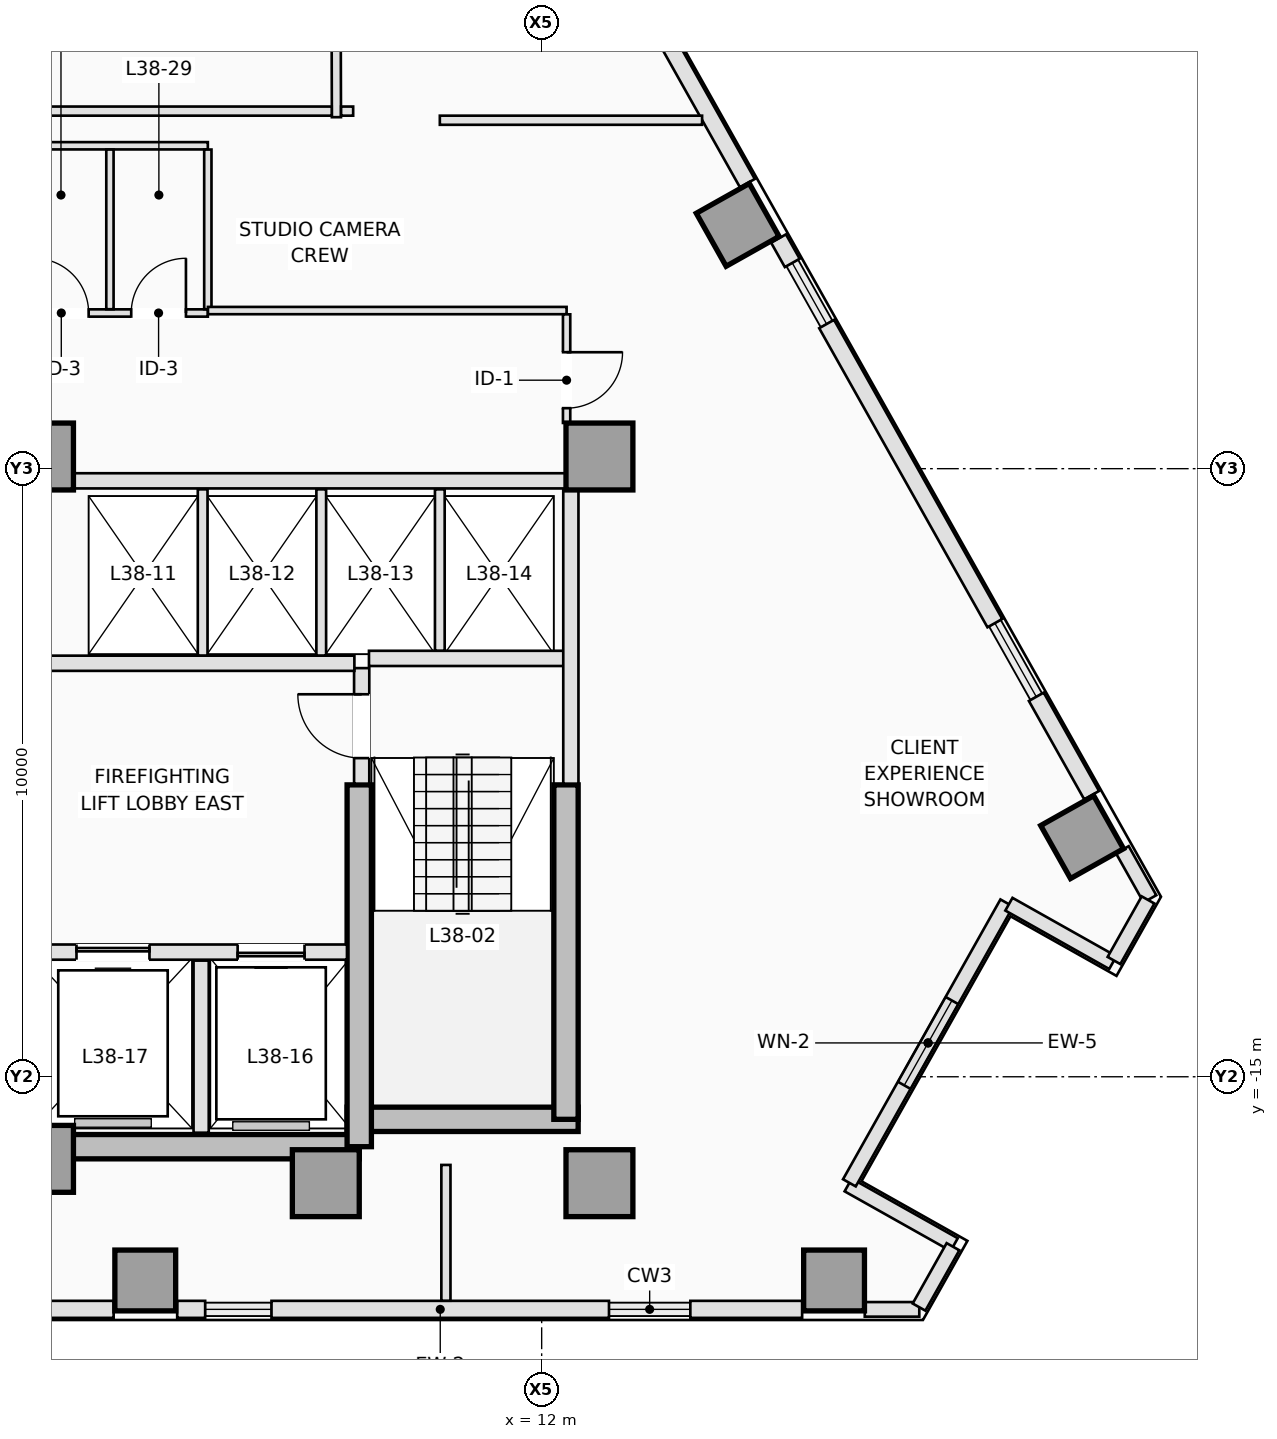
"""IFC4 building model, lengths in metres.
Left out: names, types, materials, properties, quantities, classifications, styles, units other than length and angle.
Written with IfcOpenShell. Run it as: python <this file> out.ifc"""

import sys

from ifc_helpers import new_model, si_unit, direction, frame, frame_2d, origin, origin_2d, place, context, subcontext, project, spatial, rectangle, extrude, element, fill, save


model = new_model("IFC4")
c1 = context("Model", 3, precision=1e-05, world=origin(), true_north=direction((0.0, 1.0)))
c2 = subcontext(c1, "Body", "Model", "MODEL_VIEW")
j1 = project(units=[si_unit("LENGTHUNIT", "METRE"), si_unit("PLANEANGLEUNIT", "RADIAN")], contexts=[c1])
p1 = place(None, origin())
s1 = spatial("IfcSite", under=j1, at=p1, CompositionType="ELEMENT")
p2 = place(p1, origin())
s2 = spatial("IfcBuilding", under=s1, at=p2, CompositionType="ELEMENT")
p3 = place(p2, frame((0.0, 0.0, 140.5)))
s3 = spatial("IfcBuildingStorey", under=s2, at=p3, CompositionType="ELEMENT", Elevation=140.5)
p4 = place(p3, frame((3.75, -16.15, 0.0), z_axis=(0.0, 0.0, 1.0), x_axis=(1.0, 0.0, 0.0)))
e1 = element("IfcWall", 1, at=p4, inside=s3, PredefinedType="SHEAR", context=c2, shape_type="SweptSolid", body=[
    extrude(rectangle(XDim=5.25, YDim=0.4, at=frame_2d((2.625, 0.0))), origin(), (0.0, 0.0, 1.0), 3.5),
])
p5 = place(p3, frame((8.8, -15.7, 0.0), z_axis=(0.0, 0.0, 1.0), x_axis=(1.0, 0.0, 0.0)))
e2 = element("IfcWall", 2, at=p5, inside=s3, PredefinedType="SHEAR", context=c2, shape_type="SweptSolid", body=[
    extrude(rectangle(XDim=3.8, YDim=0.4, at=frame_2d((1.9, 0.0))), origin(), (0.0, 0.0, 1.0), 3.5),
])
p6 = place(p3, frame((12.4, -15.7, 0.0), z_axis=(0.0, 0.0, 1.0), x_axis=(0.0, 1.0, 0.0)))
e3 = element("IfcWall", 3, at=p6, inside=s3, PredefinedType="SHEAR", context=c2, shape_type="SweptSolid", body=[
    extrude(rectangle(XDim=5.5, YDim=0.4, at=frame_2d((2.75, 0.0))), origin(), (0.0, 0.0, 1.0), 3.5),
])
p7 = place(p3, frame((9.0, -16.15, 0.0), z_axis=(0.0, 0.0, 1.0), x_axis=(0.0, 1.0, 0.0)))
e4 = element("IfcWall", 4, at=p7, inside=s3, PredefinedType="SHEAR", context=c2, shape_type="SweptSolid", body=[
    extrude(rectangle(XDim=5.95, YDim=0.4, at=frame_2d((2.975, 0.0))), origin(), (0.0, 0.0, 1.0), 3.5),
])
for number, where, z_axis, x_axis in (
    (5, (3.75, -16.35, 0.0), (0.0, 0.0, 1.0), (1.0, 0.0, 0.0)),
    (6, (8.45, -16.75, 0.0), (0.0, 0.0, 1.0), (1.0, 0.0, 0.0)),
    (7, (12.95, -16.75, 0.0), (0.0, 0.0, 1.0), (1.0, 0.0, 0.0)),
    (8, (3.75, -4.8, 0.0), (0.0, 0.0, 1.0), (1.0, 0.0, 0.0)),
    (9, (12.95, -4.8, 0.0), (0.0, 0.0, 1.0), (1.0, 0.0, 0.0)),
):
    element("IfcColumn", number, at=place(p3, frame(where, z_axis=z_axis, x_axis=x_axis)), inside=s3, PredefinedType="COLUMN", context=c2, shape_type="SweptSolid", body=[
        extrude(rectangle(XDim=1.1, YDim=1.1, at=origin_2d()), origin(), (0.0, 0.0, 1.0), 3.5),
    ])
for number, where, z_axis, x_axis in (
    (10, (5.481, -18.35, 0.0), (0.0, 0.0, 1.0), (0.0, 1.0, 0.0)),
    (11, (16.808, -18.35, 0.0), (0.0, 0.0, 1.0), (0.0, 1.0, 0.0)),
    (12, (20.888, -11.06, 0.0), (0.0, 0.0, 1.0), (0.872, 0.49, 0.0)),
    (13, (15.224, -0.991, 0.0), (0.0, 0.0, 1.0), (0.872, 0.49, 0.0)),
):
    element("IfcColumn", number, at=place(p3, frame(where, z_axis=z_axis, x_axis=x_axis)), inside=s3, PredefinedType="COLUMN", context=c2, shape_type="SweptSolid", body=[
        extrude(rectangle(XDim=1.0, YDim=1.0, at=origin_2d()), origin(), (0.0, 0.0, 1.0), 3.5),
    ])
p8 = place(p3, frame((18.21, -18.825, 0.0), z_axis=(0.0, 0.0, 1.0), x_axis=(-1.0, 0.0, 0.0)))
e14 = element("IfcWall", 14, at=p8, inside=s3, PredefinedType="STANDARD", context=c2, shape_type="SweptSolid", body=[
    extrude(rectangle(XDim=0.896, YDim=0.24, at=frame_2d((0.448, 0.0))), origin(), (0.0, 0.0, 1.0), 3.25),
])
p9 = place(p3, frame((16.283, -18.825, 0.0), z_axis=(0.0, 0.0, 1.0), x_axis=(-1.0, 0.0, 0.0)))
e15 = element("IfcWall", 15, at=p9, inside=s3, PredefinedType="STANDARD", context=c2, shape_type="SweptSolid", body=[
    extrude(rectangle(XDim=1.838, YDim=0.28, at=frame_2d((0.919, 0.0))), origin(), (0.0, 0.0, 1.0), 3.25),
])
p10 = place(p3, frame((13.107, -18.825, 0.0), z_axis=(0.0, 0.0, 1.0), x_axis=(-1.0, 0.0, 0.0)))
e16 = element("IfcWall", 16, at=p10, inside=s3, PredefinedType="STANDARD", context=c2, shape_type="SweptSolid", body=[
    extrude(rectangle(XDim=5.55, YDim=0.28, at=frame_2d((2.775, 0.0))), origin(), (0.0, 0.0, 1.0), 3.25),
])
p11 = place(p3, frame((6.466, -18.825, 0.0), z_axis=(0.0, 0.0, 1.0), x_axis=(-1.0, 0.0, 0.0)))
e17 = element("IfcWall", 17, at=p11, inside=s3, PredefinedType="STANDARD", context=c2, shape_type="SweptSolid", body=[
    extrude(rectangle(XDim=0.46, YDim=0.28, at=frame_2d((0.23, 0.0))), origin(), (0.0, 0.0, 1.0), 3.25),
])
p12 = place(p3, frame((4.961, -18.825, 0.0), z_axis=(0.0, 0.0, 1.0), x_axis=(-1.0, 0.0, 0.0)))
e18 = element("IfcWall", 18, at=p12, inside=s3, PredefinedType="STANDARD", context=c2, shape_type="SweptSolid", body=[
    extrude(rectangle(XDim=4.292, YDim=0.28, at=frame_2d((2.146, 0.0))), origin(), (0.0, 0.0, 1.0), 3.25),
])
p13 = place(p3, frame((21.549, -11.267, 0.0), z_axis=(0.0, 0.0, 1.0), x_axis=(0.490248718924, -0.871582579905, 0.0)))
e19 = element("IfcWall", 19, at=p13, inside=s3, PredefinedType="STANDARD", context=c2, shape_type="SweptSolid", body=[
    extrude(rectangle(XDim=0.926, YDim=0.24, at=frame_2d((0.463, 0.0))), origin(), (0.0, 0.0, 1.0), 3.25),
])
p14 = place(p3, frame((15.896, -1.215, 0.0), z_axis=(0.0, 0.0, 1.0), x_axis=(0.490009165718, -0.871717280724, 0.0)))
e20 = element("IfcWall", 20, at=p14, inside=s3, PredefinedType="STANDARD", context=c2, shape_type="SweptSolid", body=[
    extrude(rectangle(XDim=0.46, YDim=0.28, at=frame_2d((0.23, 0.0))), origin(), (0.0, 0.0, 1.0), 3.25),
])
p15 = place(p3, frame((16.686, -2.621, 0.0), z_axis=(0.0, 0.0, 1.0), x_axis=(0.490238645956, -0.871588245682, 0.0)))
e21 = element("IfcWall", 21, at=p15, inside=s3, PredefinedType="STANDARD", context=c2, shape_type="SweptSolid", body=[
    extrude(rectangle(XDim=5.643, YDim=0.28, at=frame_2d((2.822, 0.0))), origin(), (0.0, 0.0, 1.0), 3.25),
])
p16 = place(p3, frame((20.134, -8.751, 0.0), z_axis=(0.0, 0.0, 1.0), x_axis=(0.490248749158, -0.871582562899, 0.0)))
e22 = element("IfcWall", 22, at=p16, inside=s3, PredefinedType="STANDARD", context=c2, shape_type="SweptSolid", body=[
    extrude(rectangle(XDim=1.856, YDim=0.28, at=frame_2d((0.928, 0.0))), origin(), (0.0, 0.0, 1.0), 3.25),
])
p17 = place(p3, frame((13.238, 3.509, 0.0), z_axis=(0.0, 0.0, 1.0), x_axis=(0.490232095789, -0.871591929895, 0.0)))
e23 = element("IfcWall", 23, at=p17, inside=s3, PredefinedType="STANDARD", context=c2, shape_type="SweptSolid", body=[
    extrude(rectangle(XDim=4.375, YDim=0.28, at=frame_2d((2.188, 0.0))), origin(), (0.0, 0.0, 1.0), 3.25),
])
p18 = place(p3, frame((18.784, -17.76, 0.0), z_axis=(0.0, 0.0, 1.0), x_axis=(-0.871536415941, 0.49033078191, 0.0)))
e24 = element("IfcWall", 24, at=p18, inside=s3, PredefinedType="STANDARD", context=c2, shape_type="SweptSolid", body=[
    extrude(rectangle(XDim=2.0, YDim=0.24, at=frame_2d((1.0, 0.0))), origin(), (0.0, 0.0, 1.0), 3.25),
])
p19 = place(p3, frame((17.06, -16.744, 0.0), z_axis=(0.0, 0.0, 1.0), x_axis=(0.490276606961, 0.871566892824, 0.0)))
e25 = element("IfcWall", 25, at=p19, inside=s3, PredefinedType="STANDARD", context=c2, shape_type="SweptSolid", body=[
    extrude(rectangle(XDim=5.28, YDim=0.24, at=frame_2d((2.64, 0.0))), origin(), (0.0, 0.0, 1.0), 3.25),
])
p20 = place(p19, frame((1.84, 0.0, 0.9)))
e26 = element("IfcOpeningElement", 26, at=p20, cuts=e25, PredefinedType="OPENING", context=c2, shape_type="SweptSolid", body=[
    extrude(rectangle(XDim=1.6, YDim=2.1, at=frame_2d((0.8, 1.05))), frame((0.0, 0.13, 0.0), z_axis=(0.0, -1.0, 0.0), x_axis=(1.0, 0.0, 0.0)), (0.0, 0.0, 1.0), 0.26),
])
p21 = place(p3, frame((19.684, -12.162, 0.0), z_axis=(0.0, 0.0, 1.0), x_axis=(0.871512328312, -0.490373593906, 0.0)))
e27 = element("IfcWall", 27, at=p21, inside=s3, PredefinedType="STANDARD", context=c2, shape_type="SweptSolid", body=[
    extrude(rectangle(XDim=1.96, YDim=0.24, at=frame_2d((0.98, 0.0))), origin(), (0.0, 0.0, 1.0), 3.25),
])
p22 = place(p3, frame((21.412, -13.088, 0.0), z_axis=(0.0, 0.0, 1.0), x_axis=(0.4900989379, 0.871666811958, 0.0)))
e28 = element("IfcWall", 28, at=p22, inside=s3, PredefinedType="STANDARD", context=c2, shape_type="SweptSolid", body=[
    extrude(rectangle(XDim=1.143, YDim=0.24, at=frame_2d((0.571, 0.0))), origin(), (0.0, 0.0, 1.0), 3.25),
])
p23 = place(p3, frame((18.206, -18.788, 0.0), z_axis=(0.0, 0.0, 1.0), x_axis=(0.490403700594, 0.871495387506, 0.0)))
e29 = element("IfcWall", 29, at=p23, inside=s3, PredefinedType="STANDARD", context=c2, shape_type="SweptSolid", body=[
    extrude(rectangle(XDim=1.139, YDim=0.24, at=frame_2d((0.57, 0.0))), origin(), (0.0, 0.0, 1.0), 3.25),
])
p24 = place(p3, frame((9.04, -10.18, 0.0), z_axis=(0.0, 0.0, 1.0), x_axis=(0.0, 1.0, 0.0)))
e30 = element("IfcWall", 30, at=p24, inside=s3, PredefinedType="PARTITIONING", context=c2, shape_type="SweptSolid", body=[
    extrude(rectangle(XDim=1.9, YDim=0.25, at=frame_2d((0.95, 0.0))), origin(), (0.0, 0.0, 1.0), 3.25),
])
p25 = place(p24, frame((0.42, 0.0, 0.0)))
e31 = element("IfcOpeningElement", 31, at=p25, cuts=e30, PredefinedType="OPENING", context=c2, shape_type="SweptSolid", body=[
    extrude(rectangle(XDim=1.05, YDim=2.15, at=frame_2d((0.525, 1.075))), frame((0.0, 0.135, 0.0), z_axis=(0.0, -1.0, 0.0), x_axis=(1.0, 0.0, 0.0)), (0.0, 0.0, 1.0), 0.27),
])
p26 = place(p3, frame((9.16, -8.12, 0.0), z_axis=(0.0, 0.0, 1.0), x_axis=(1.0, 0.0, 0.0)))
e32 = element("IfcWall", 32, at=p26, inside=s3, PredefinedType="PARTITIONING", context=c2, shape_type="SweptSolid", body=[
    extrude(rectangle(XDim=3.22, YDim=0.25, at=frame_2d((1.61, 0.0))), origin(), (0.0, 0.0, 1.0), 3.25),
])
p27 = place(p3, frame((12.48, -10.18, 0.0), z_axis=(0.0, 0.0, 1.0), x_axis=(0.0, 1.0, 0.0)))
e33 = element("IfcWall", 33, at=p27, inside=s3, PredefinedType="PARTITIONING", context=c2, shape_type="SweptSolid", body=[
    extrude(rectangle(XDim=4.828, YDim=0.25, at=frame_2d((2.414, 0.0))), origin(), (0.0, 0.0, 1.0), 3.25),
])
p28 = place(p3, frame((3.68, -12.95, 0.0), z_axis=(0.0, 0.0, 1.0), x_axis=(1.0, 0.0, 0.0)))
e34 = element("IfcWall", 34, at=p28, inside=s3, PredefinedType="PARTITIONING", context=c2, shape_type="SweptSolid", body=[
    extrude(rectangle(XDim=5.118, YDim=0.25, at=frame_2d((2.559, 0.0))), origin(), (0.0, 0.0, 1.0), 3.25),
])
p29 = place(p28, frame((3.32, 0.0, 0.0)))
e35 = element("IfcOpeningElement", 35, at=p29, cuts=e34, PredefinedType="OPENING", context=c2, shape_type="SweptSolid", body=[
    extrude(rectangle(XDim=1.1, YDim=2.15, at=frame_2d((0.55, 1.075))), frame((0.0, 0.135, 0.0), z_axis=(0.0, -1.0, 0.0), x_axis=(1.0, 0.0, 0.0)), (0.0, 0.0, 1.0), 0.27),
])
p30 = place(p28, frame((0.67, 0.0, 0.0)))
e36 = element("IfcOpeningElement", 36, at=p30, cuts=e34, PredefinedType="OPENING", context=c2, shape_type="SweptSolid", body=[
    extrude(rectangle(XDim=1.2, YDim=2.15, at=frame_2d((0.6, 1.075))), frame((0.0, 0.135, 0.0), z_axis=(0.0, -1.0, 0.0), x_axis=(1.0, 0.0, 0.0)), (0.0, 0.0, 1.0), 0.27),
])
p31 = place(p3, frame((6.4, -15.92, 0.0), z_axis=(0.0, 0.0, 1.0), x_axis=(0.0, 1.0, 0.0)))
e37 = element("IfcWall", 37, at=p31, inside=s3, PredefinedType="PARTITIONING", context=c2, shape_type="SweptSolid", body=[
    extrude(rectangle(XDim=2.83, YDim=0.25, at=frame_2d((1.415, 0.0))), origin(), (0.0, 0.0, 1.0), 3.25),
])
p32 = place(p3, frame((3.68, -8.2, 0.0), z_axis=(0.0, 0.0, 1.0), x_axis=(1.0, 0.0, 0.0)))
e38 = element("IfcWall", 38, at=p32, inside=s3, PredefinedType="PARTITIONING", context=c2, shape_type="SweptSolid", body=[
    extrude(rectangle(XDim=5.24, YDim=0.25, at=frame_2d((2.62, 0.0))), origin(), (0.0, 0.0, 1.0), 3.25),
])
p33 = place(p3, frame((4.302, -5.2, 0.0), z_axis=(0.0, 0.0, 1.0), x_axis=(1.0, 0.0, 0.0)))
e39 = element("IfcWall", 39, at=p33, inside=s3, PredefinedType="PARTITIONING", context=c2, shape_type="SweptSolid", body=[
    extrude(rectangle(XDim=8.096, YDim=0.25, at=frame_2d((4.048, 0.0))), origin(), (0.0, 0.0, 1.0), 3.25),
])
for number, where, z_axis, x_axis in (
    (40, (6.425, -8.073, 0.0), (0.0, 0.0, 1.0), (0.0, 1.0, 0.0)),
    (41, (8.375, -8.073, 0.0), (0.0, 0.0, 1.0), (0.0, 1.0, 0.0)),
):
    element("IfcWall", number, at=place(p3, frame(where, z_axis=z_axis, x_axis=x_axis)), inside=s3, PredefinedType="PARTITIONING", context=c2, shape_type="SweptSolid", body=[
        extrude(rectangle(XDim=2.733, YDim=0.16, at=frame_2d((1.366, 0.0))), origin(), (0.0, 0.0, 1.0), 3.25),
    ])
p34 = place(p3, frame((10.325, -7.993, 0.0), z_axis=(0.0, 0.0, 1.0), x_axis=(0.0, 1.0, 0.0)))
e42 = element("IfcWall", 42, at=p34, inside=s3, PredefinedType="PARTITIONING", context=c2, shape_type="SweptSolid", body=[
    extrude(rectangle(XDim=2.653, YDim=0.16, at=frame_2d((1.326, 0.0))), origin(), (0.0, 0.0, 1.0), 3.25),
])
p35 = place(p3, frame((3.29, -2.44, 0.0), z_axis=(0.0, 0.0, 1.0), x_axis=(1.0, 0.0, 0.0)))
e43 = element("IfcWall", 43, at=p35, inside=s3, PredefinedType="PARTITIONING", context=c2, shape_type="SweptSolid", body=[
    extrude(rectangle(XDim=3.22, YDim=0.12, at=frame_2d((1.61, 0.0))), origin(), (0.0, 0.0, 1.0), 2.891),
])
p36 = place(p35, frame((0.36, 0.0, 0.0)))
e44 = element("IfcOpeningElement", 44, at=p36, cuts=e43, PredefinedType="OPENING", context=c2, shape_type="SweptSolid", body=[
    extrude(rectangle(XDim=0.9, YDim=2.12, at=frame_2d((0.45, 1.06))), frame((0.0, 0.07, 0.0), z_axis=(0.0, -1.0, 0.0), x_axis=(1.0, 0.0, 0.0)), (0.0, 0.0, 1.0), 0.14),
])
p37 = place(p35, frame((1.96, 0.0, 0.0)))
e45 = element("IfcOpeningElement", 45, at=p37, cuts=e43, PredefinedType="OPENING", context=c2, shape_type="SweptSolid", body=[
    extrude(rectangle(XDim=0.9, YDim=2.12, at=frame_2d((0.45, 1.06))), frame((0.0, 0.07, 0.0), z_axis=(0.0, -1.0, 0.0), x_axis=(1.0, 0.0, 0.0)), (0.0, 0.0, 1.0), 0.14),
])
p38 = place(p3, frame((3.29, 0.31, 0.0), z_axis=(0.0, 0.0, 1.0), x_axis=(1.0, 0.0, 0.0)))
e46 = element("IfcWall", 46, at=p38, inside=s3, PredefinedType="PARTITIONING", context=c2, shape_type="SweptSolid", body=[
    extrude(rectangle(XDim=3.22, YDim=0.12, at=frame_2d((1.61, 0.0))), origin(), (0.0, 0.0, 1.0), 3.25),
])
for number, where, z_axis, x_axis in (
    (47, (4.9, -2.378, 0.0), (0.0, 0.0, 1.0), (0.0, 1.0, 0.0)),
    (48, (6.51, -2.378, 0.0), (0.0, 0.0, 1.0), (0.0, 1.0, 0.0)),
):
    element("IfcWall", number, at=place(p3, frame(where, z_axis=z_axis, x_axis=x_axis)), inside=s3, PredefinedType="PARTITIONING", context=c2, shape_type="SweptSolid", body=[
        extrude(rectangle(XDim=2.626, YDim=0.12, at=frame_2d((1.313, 0.0))), origin(), (0.0, 0.0, 1.0), 3.25),
    ])
p39 = place(p3, frame((6.512, -2.4, 0.0), z_axis=(0.0, 0.0, 1.0), x_axis=(1.0, 0.0, 0.0)))
e49 = element("IfcWall", 49, at=p39, inside=s3, PredefinedType="PARTITIONING", context=c2, shape_type="SweptSolid", body=[
    extrude(rectangle(XDim=5.898, YDim=0.12, at=frame_2d((2.949, 0.0))), origin(), (0.0, 0.0, 1.0), 3.25),
])
p40 = place(p3, frame((12.41, -2.462, 0.0), z_axis=(0.0, 0.0, 1.0), x_axis=(0.0, -1.0, 0.0)))
e50 = element("IfcWall", 50, at=p40, inside=s3, PredefinedType="PARTITIONING", context=c2, shape_type="SweptSolid", body=[
    extrude(rectangle(XDim=1.786, YDim=0.12, at=frame_2d((0.893, 0.0))), origin(), (0.0, 0.0, 1.0), 3.25),
])
p41 = place(p40, frame((0.623, 0.0, 0.0)))
e51 = element("IfcOpeningElement", 51, at=p41, cuts=e50, PredefinedType="OPENING", context=c2, shape_type="SweptSolid", body=[
    extrude(rectangle(XDim=0.92, YDim=2.12, at=frame_2d((0.46, 1.06))), frame((0.0, 0.07, 0.0), z_axis=(0.0, -1.0, 0.0), x_axis=(1.0, 0.0, 0.0)), (0.0, 0.0, 1.0), 0.14),
])
p42 = place(p3, frame((8.625, 0.78, 0.0), z_axis=(0.0, 0.0, 1.0), x_axis=(-0.002664604467, 0.999996449935, 0.0)))
e52 = element("IfcWall", 52, at=p42, inside=s3, PredefinedType="PARTITIONING", context=c2, shape_type="SweptSolid", body=[
    extrude(rectangle(XDim=4.123, YDim=0.15, at=frame_2d((2.062, 0.0))), origin(), (0.0, 0.0, 1.0), 3.25),
])
p43 = place(p3, frame((14.638, 0.73, 0.0), z_axis=(0.0, 0.0, 1.0), x_axis=(-1.0, 0.0, 0.0)))
e53 = element("IfcWall", 53, at=p43, inside=s3, PredefinedType="PARTITIONING", context=c2, shape_type="SweptSolid", body=[
    extrude(rectangle(XDim=4.313, YDim=0.15, at=frame_2d((2.156, 0.0))), origin(), (0.0, 0.0, 1.0), 3.25),
])
p44 = place(p3, frame((8.9, 0.88, 0.0), z_axis=(0.0, 0.0, 1.0), x_axis=(-1.0, 0.0, 0.0)))
e54 = element("IfcWall", 54, at=p44, inside=s3, PredefinedType="PARTITIONING", context=c2, shape_type="SweptSolid", body=[
    extrude(rectangle(XDim=0.198, YDim=0.15, at=frame_2d((0.099, 0.0))), origin(), (0.0, 0.0, 1.0), 3.25),
])
p45 = place(p3, frame((8.548, 0.88, 0.0), z_axis=(0.0, 0.0, 1.0), x_axis=(-1.0, 0.0, 0.0)))
e55 = element("IfcWall", 55, at=p45, inside=s3, PredefinedType="PARTITIONING", context=c2, shape_type="SweptSolid", body=[
    extrude(rectangle(XDim=7.368, YDim=0.15, at=frame_2d((3.684, 0.0))), origin(), (0.0, 0.0, 1.0), 3.25),
])
p46 = place(p3, frame((10.425, -18.683, 0.0), z_axis=(0.0, 0.0, 1.0), x_axis=(0.0, 1.0, 0.0)))
e56 = element("IfcWall", 56, at=p46, inside=s3, PredefinedType="PARTITIONING", context=c2, shape_type="SweptSolid", body=[
    extrude(rectangle(XDim=2.233, YDim=0.15, at=frame_2d((1.117, 0.0))), origin(), (0.0, 0.0, 1.0), 3.25),
])
p47 = place(p20, origin())
e57 = element("IfcWindow", 57, at=p47, inside=s3, PartitioningType="SINGLE_PANEL", PredefinedType="WINDOW", context=c2, shape_type="SweptSolid", body=[
    extrude(rectangle(XDim=1.6, YDim=2.1, at=frame_2d((0.8, 1.05))), frame((0.0, 0.03, 0.0), z_axis=(0.0, -1.0, 0.0), x_axis=(1.0, 0.0, 0.0)), (0.0, 0.0, 1.0), 0.06),
])
fill(e26, e57)
p48 = place(p29, origin())
e58 = element("IfcDoor", 58, at=p48, inside=s3, OperationType="SLIDING_TO_RIGHT", PredefinedType="DOOR", context=c2, shape_type="SweptSolid", body=[
    extrude(rectangle(XDim=1.1, YDim=2.15, at=frame_2d((0.55, 1.075))), frame((0.0, 0.025, 0.0), z_axis=(0.0, -1.0, 0.0), x_axis=(1.0, 0.0, 0.0)), (0.0, 0.0, 1.0), 0.05),
])
fill(e35, e58)
p49 = place(p30, origin())
e59 = element("IfcDoor", 59, at=p49, inside=s3, OperationType="SLIDING_TO_LEFT", PredefinedType="DOOR", context=c2, shape_type="SweptSolid", body=[
    extrude(rectangle(XDim=1.2, YDim=2.15, at=frame_2d((0.6, 1.075))), frame((0.0, 0.025, 0.0), z_axis=(0.0, -1.0, 0.0), x_axis=(1.0, 0.0, 0.0)), (0.0, 0.0, 1.0), 0.05),
])
fill(e36, e59)
p50 = place(p25, origin())
e60 = element("IfcDoor", 60, at=p50, inside=s3, OperationType="SINGLE_SWING_RIGHT", PredefinedType="DOOR", context=c2, shape_type="SweptSolid", body=[
    extrude(rectangle(XDim=1.05, YDim=2.15, at=frame_2d((0.525, 1.075))), frame((0.0, 0.025, 0.0), z_axis=(0.0, -1.0, 0.0), x_axis=(1.0, 0.0, 0.0)), (0.0, 0.0, 1.0), 0.05),
])
fill(e31, e60)
p51 = place(p36, origin())
e61 = element("IfcDoor", 61, at=p51, inside=s3, OperationType="SINGLE_SWING_LEFT", PredefinedType="DOOR", context=c2, shape_type="SweptSolid", body=[
    extrude(rectangle(XDim=0.9, YDim=2.12, at=frame_2d((0.45, 1.06))), frame((0.0, 0.025, 0.0), z_axis=(0.0, -1.0, 0.0), x_axis=(1.0, 0.0, 0.0)), (0.0, 0.0, 1.0), 0.05),
])
fill(e44, e61)
p52 = place(p37, origin())
e62 = element("IfcDoor", 62, at=p52, inside=s3, OperationType="SINGLE_SWING_RIGHT", PredefinedType="DOOR", context=c2, shape_type="SweptSolid", body=[
    extrude(rectangle(XDim=0.9, YDim=2.12, at=frame_2d((0.45, 1.06))), frame((0.0, 0.025, 0.0), z_axis=(0.0, -1.0, 0.0), x_axis=(1.0, 0.0, 0.0)), (0.0, 0.0, 1.0), 0.05),
])
fill(e45, e62)
p53 = place(p41, origin())
e63 = element("IfcDoor", 63, at=p53, inside=s3, OperationType="SINGLE_SWING_LEFT", PredefinedType="DOOR", context=c2, shape_type="SweptSolid", body=[
    extrude(rectangle(XDim=0.92, YDim=2.12, at=frame_2d((0.46, 1.06))), frame((0.0, 0.025, 0.0), z_axis=(0.0, -1.0, 0.0), x_axis=(1.0, 0.0, 0.0)), (0.0, 0.0, 1.0), 0.05),
])
fill(e51, e63)
save(model, sys.argv[1])
